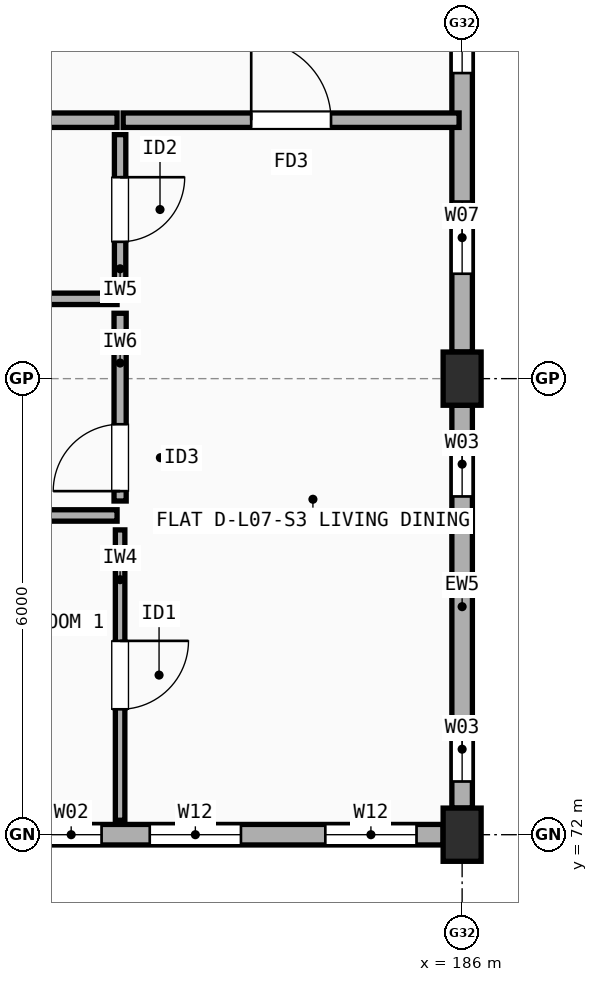
"""IFC4 building model, lengths in metres.
Left out: names, types, materials, properties, quantities, classifications, styles, units other than length and angle.
Written with IfcOpenShell. Run it as: python <this file> out.ifc"""

import sys

from ifc_helpers import new_model, si_unit, direction, frame, frame_2d, origin, origin_2d, place, context, subcontext, project, spatial, rectangle, extrude, element, fill, save


model = new_model("IFC4")
c1 = context("Model", 3, precision=1e-05, world=origin(), true_north=direction((0.0, 1.0)))
c2 = subcontext(c1, "Body", "Model", "MODEL_VIEW")
j1 = project(units=[si_unit("LENGTHUNIT", "METRE"), si_unit("PLANEANGLEUNIT", "RADIAN")], contexts=[c1])
p1 = place(None, origin())
s1 = spatial("IfcSite", under=j1, at=p1, CompositionType="ELEMENT")
p2 = place(p1, origin())
s2 = spatial("IfcBuilding", under=s1, at=p2, CompositionType="ELEMENT")
p3 = place(p2, frame((0.0, 0.0, 23.7)))
s3 = spatial("IfcBuildingStorey", under=s2, at=p3, CompositionType="ELEMENT", Elevation=23.7)
for number, where, z_axis, x_axis in (
    (1, (186.0, 72.0, 0.0), (0.0, 0.0, 1.0), (1.0, 0.0, 0.0)),
    (2, (186.0, 78.0, 0.0), (0.0, 0.0, 1.0), (1.0, 0.0, 0.0)),
):
    element("IfcColumn", number, at=place(p3, frame(where, z_axis=z_axis, x_axis=x_axis)), inside=s3, PredefinedType="COLUMN", context=c2, shape_type="SweptSolid", body=[
        extrude(rectangle(XDim=0.5, YDim=0.7, at=origin_2d()), origin(), (0.0, 0.0, 1.0), 2.975),
    ])
p4 = place(p3, frame((180.275, 72.0, 0.0), z_axis=(0.0, 0.0, 1.0), x_axis=(1.0, 0.0, 0.0)))
e3 = element("IfcWall", 3, at=p4, inside=s3, PredefinedType="STANDARD", context=c2, shape_type="SweptSolid", body=[
    extrude(rectangle(XDim=5.475, YDim=0.27, at=frame_2d((2.738, 0.0))), origin(), (0.0, 0.0, 1.0), 2.457),
])
p5 = place(p4, frame((1.615, 0.0, 0.9)))
e4 = element("IfcOpeningElement", 4, at=p5, cuts=e3, PredefinedType="OPENING", context=c2, shape_type="SweptSolid", body=[
    extrude(rectangle(XDim=1.2, YDim=1.35, at=frame_2d((0.6, 0.675))), frame((0.0, 0.145, 0.0), z_axis=(0.0, -1.0, 0.0), x_axis=(1.0, 0.0, 0.0)), (0.0, 0.0, 1.0), 0.29),
])
p6 = place(p4, frame((3.925, 0.0, 0.9)))
e5 = element("IfcOpeningElement", 5, at=p6, cuts=e3, PredefinedType="OPENING", context=c2, shape_type="SweptSolid", body=[
    extrude(rectangle(XDim=1.2, YDim=1.35, at=frame_2d((0.6, 0.675))), frame((0.0, 0.145, 0.0), z_axis=(0.0, -1.0, 0.0), x_axis=(1.0, 0.0, 0.0)), (0.0, 0.0, 1.0), 0.29),
])
p7 = place(p4, frame((0.181, 0.0, 0.9)))
e6 = element("IfcOpeningElement", 6, at=p7, cuts=e3, PredefinedType="OPENING", context=c2, shape_type="SweptSolid", body=[
    extrude(rectangle(XDim=0.8, YDim=1.2, at=frame_2d((0.4, 0.6))), frame((0.0, 0.145, 0.0), z_axis=(0.0, -1.0, 0.0), x_axis=(1.0, 0.0, 0.0)), (0.0, 0.0, 1.0), 0.29),
])
p8 = place(p3, frame((186.0, 72.35, 0.0), z_axis=(0.0, 0.0, 1.0), x_axis=(0.0, 1.0, 0.0)))
e7 = element("IfcWall", 7, at=p8, inside=s3, PredefinedType="STANDARD", context=c2, shape_type="SweptSolid", body=[
    extrude(rectangle(XDim=5.3, YDim=0.27, at=frame_2d((2.65, 0.0))), origin(), (0.0, 0.0, 1.0), 2.457),
])
p9 = place(p8, frame((0.35, 0.0, 0.9)))
e8 = element("IfcOpeningElement", 8, at=p9, cuts=e7, PredefinedType="OPENING", context=c2, shape_type="SweptSolid", body=[
    extrude(rectangle(XDim=0.85, YDim=1.25, at=frame_2d((0.425, 0.625))), frame((0.0, 0.145, 0.0), z_axis=(0.0, -1.0, 0.0), x_axis=(1.0, 0.0, 0.0)), (0.0, 0.0, 1.0), 0.29),
])
p10 = place(p8, frame((4.1, 0.0, 0.9)))
e9 = element("IfcOpeningElement", 9, at=p10, cuts=e7, PredefinedType="OPENING", context=c2, shape_type="SweptSolid", body=[
    extrude(rectangle(XDim=0.85, YDim=1.25, at=frame_2d((0.425, 0.625))), frame((0.0, 0.145, 0.0), z_axis=(0.0, -1.0, 0.0), x_axis=(1.0, 0.0, 0.0)), (0.0, 0.0, 1.0), 0.29),
])
p11 = place(p3, frame((186.0, 78.35, 0.0), z_axis=(0.0, 0.0, 1.0), x_axis=(0.0, 1.0, 0.0)))
e10 = element("IfcWall", 10, at=p11, inside=s3, PredefinedType="STANDARD", context=c2, shape_type="SweptSolid", body=[
    extrude(rectangle(XDim=5.3, YDim=0.27, at=frame_2d((2.65, 0.0))), origin(), (0.0, 0.0, 1.0), 2.457),
])
p12 = place(p11, frame((1.03, 0.0, 0.9)))
e11 = element("IfcOpeningElement", 11, at=p12, cuts=e10, PredefinedType="OPENING", context=c2, shape_type="SweptSolid", body=[
    extrude(rectangle(XDim=0.95, YDim=1.35, at=frame_2d((0.475, 0.675))), frame((0.0, 0.145, 0.0), z_axis=(0.0, -1.0, 0.0), x_axis=(1.0, 0.0, 0.0)), (0.0, 0.0, 1.0), 0.29),
])
p13 = place(p11, frame((3.67, 0.0, 0.9)))
e12 = element("IfcOpeningElement", 12, at=p13, cuts=e10, PredefinedType="OPENING", context=c2, shape_type="SweptSolid", body=[
    extrude(rectangle(XDim=1.05, YDim=1.35, at=frame_2d((0.525, 0.675))), frame((0.0, 0.145, 0.0), z_axis=(0.0, -1.0, 0.0), x_axis=(1.0, 0.0, 0.0)), (0.0, 0.0, 1.0), 0.29),
])
p14 = place(p3, frame((178.54, 81.4, 0.0), z_axis=(0.0, 0.0, 1.0), x_axis=(1.0, 0.0, 0.0)))
e13 = element("IfcWall", 13, at=p14, inside=s3, PredefinedType="SOLIDWALL", context=c2, shape_type="SweptSolid", body=[
    extrude(rectangle(XDim=2.92, YDim=0.19, at=frame_2d((1.46, 0.0))), origin(), (0.0, 0.0, 1.0), 2.458),
])
p15 = place(p3, frame((181.54, 81.4, 0.0), z_axis=(0.0, 0.0, 1.0), x_axis=(1.0, 0.0, 0.0)))
e14 = element("IfcWall", 14, at=p15, inside=s3, PredefinedType="SOLIDWALL", context=c2, shape_type="SweptSolid", body=[
    extrude(rectangle(XDim=4.42, YDim=0.19, at=frame_2d((2.21, 0.0))), origin(), (0.0, 0.0, 1.0), 2.457),
])
p16 = place(p15, frame((1.685, 0.0, 0.0)))
e15 = element("IfcOpeningElement", 15, at=p16, cuts=e14, PredefinedType="OPENING", context=c2, shape_type="SweptSolid", body=[
    extrude(rectangle(XDim=1.05, YDim=2.15, at=frame_2d((0.525, 1.075))), frame((0.0, 0.105, 0.0), z_axis=(0.0, -1.0, 0.0), x_axis=(1.0, 0.0, 0.0)), (0.0, 0.0, 1.0), 0.21),
])
p17 = place(p3, frame((181.5, 72.19, 0.0), z_axis=(0.0, 0.0, 1.0), x_axis=(0.0, 1.0, 0.0)))
e16 = element("IfcWall", 16, at=p17, inside=s3, PredefinedType="PARTITIONING", context=c2, shape_type="SweptSolid", body=[
    extrude(rectangle(XDim=3.82, YDim=0.125, at=frame_2d((1.91, 0.0))), origin(), (0.0, 0.0, 1.0), 2.975),
])
p18 = place(p17, frame((1.46, 0.0, 0.0)))
e17 = element("IfcOpeningElement", 17, at=p18, cuts=e16, PredefinedType="OPENING", context=c2, shape_type="SweptSolid", body=[
    extrude(rectangle(XDim=0.9, YDim=2.1, at=frame_2d((0.45, 1.05))), frame((0.0, 0.073, 0.0), z_axis=(0.0, -1.0, 0.0), x_axis=(1.0, 0.0, 0.0)), (0.0, 0.0, 1.0), 0.145),
])
p19 = place(p3, frame((181.5, 76.39, 0.0), z_axis=(0.0, 0.0, 1.0), x_axis=(0.0, 1.0, 0.0)))
e18 = element("IfcWall", 18, at=p19, inside=s3, PredefinedType="PLUMBINGWALL", context=c2, shape_type="SweptSolid", body=[
    extrude(rectangle(XDim=2.47, YDim=0.16, at=frame_2d((1.235, 0.0))), origin(), (0.0, 0.0, 1.0), 2.457),
])
p20 = place(p19, frame((0.13, 0.0, 0.0)))
e19 = element("IfcOpeningElement", 19, at=p20, cuts=e18, PredefinedType="OPENING", context=c2, shape_type="SweptSolid", body=[
    extrude(rectangle(XDim=0.88, YDim=2.1, at=frame_2d((0.44, 1.05))), frame((0.0, 0.09, 0.0), z_axis=(0.0, -1.0, 0.0), x_axis=(1.0, 0.0, 0.0)), (0.0, 0.0, 1.0), 0.18),
])
p21 = place(p3, frame((181.5, 79.24, 0.0), z_axis=(0.0, 0.0, 1.0), x_axis=(0.0, 1.0, 0.0)))
e20 = element("IfcWall", 20, at=p21, inside=s3, PredefinedType="PARTITIONING", context=c2, shape_type="SweptSolid", body=[
    extrude(rectangle(XDim=1.97, YDim=0.15, at=frame_2d((0.985, 0.0))), origin(), (0.0, 0.0, 1.0), 2.975),
])
p22 = place(p21, frame((0.56, 0.0, 0.0)))
e21 = element("IfcOpeningElement", 21, at=p22, cuts=e20, PredefinedType="OPENING", context=c2, shape_type="SweptSolid", body=[
    extrude(rectangle(XDim=0.85, YDim=2.1, at=frame_2d((0.425, 1.05))), frame((0.0, 0.085, 0.0), z_axis=(0.0, -1.0, 0.0), x_axis=(1.0, 0.0, 0.0)), (0.0, 0.0, 1.0), 0.17),
])
p23 = place(p3, frame((178.54, 76.2, 0.0), z_axis=(0.0, 0.0, 1.0), x_axis=(1.0, 0.0, 0.0)))
e22 = element("IfcWall", 22, at=p23, inside=s3, PredefinedType="PARTITIONING", context=c2, shape_type="SweptSolid", body=[
    extrude(rectangle(XDim=2.92, YDim=0.15, at=frame_2d((1.46, 0.0))), origin(), (0.0, 0.0, 1.0), 2.508),
])
p24 = place(p3, frame((178.54, 79.05, 0.0), z_axis=(0.0, 0.0, 1.0), x_axis=(1.0, 0.0, 0.0)))
e23 = element("IfcWall", 23, at=p24, inside=s3, PredefinedType="PARTITIONING", context=c2, shape_type="SweptSolid", body=[
    extrude(rectangle(XDim=2.92, YDim=0.15, at=frame_2d((1.46, 0.0))), origin(), (0.0, 0.0, 1.0), 2.458),
])
p25 = place(p5, origin())
e24 = element("IfcWindow", 24, at=p25, inside=s3, PartitioningType="SINGLE_PANEL", PredefinedType="WINDOW", context=c2, shape_type="SweptSolid", body=[
    extrude(rectangle(XDim=1.2, YDim=1.35, at=frame_2d((0.6, 0.675))), frame((0.0, 0.03, 0.0), z_axis=(0.0, -1.0, 0.0), x_axis=(1.0, 0.0, 0.0)), (0.0, 0.0, 1.0), 0.06),
])
fill(e4, e24)
p26 = place(p6, origin())
e25 = element("IfcWindow", 25, at=p26, inside=s3, PartitioningType="SINGLE_PANEL", PredefinedType="WINDOW", context=c2, shape_type="SweptSolid", body=[
    extrude(rectangle(XDim=1.2, YDim=1.35, at=frame_2d((0.6, 0.675))), frame((0.0, 0.03, 0.0), z_axis=(0.0, -1.0, 0.0), x_axis=(1.0, 0.0, 0.0)), (0.0, 0.0, 1.0), 0.06),
])
fill(e5, e25)
p27 = place(p9, origin())
e26 = element("IfcWindow", 26, at=p27, inside=s3, PartitioningType="SINGLE_PANEL", PredefinedType="WINDOW", context=c2, shape_type="SweptSolid", body=[
    extrude(rectangle(XDim=0.85, YDim=1.25, at=frame_2d((0.425, 0.625))), frame((0.0, 0.03, 0.0), z_axis=(0.0, -1.0, 0.0), x_axis=(1.0, 0.0, 0.0)), (0.0, 0.0, 1.0), 0.06),
])
fill(e8, e26)
p28 = place(p10, origin())
e27 = element("IfcWindow", 27, at=p28, inside=s3, PartitioningType="SINGLE_PANEL", PredefinedType="WINDOW", context=c2, shape_type="SweptSolid", body=[
    extrude(rectangle(XDim=0.85, YDim=1.25, at=frame_2d((0.425, 0.625))), frame((0.0, 0.03, 0.0), z_axis=(0.0, -1.0, 0.0), x_axis=(1.0, 0.0, 0.0)), (0.0, 0.0, 1.0), 0.06),
])
fill(e9, e27)
p29 = place(p12, origin())
e28 = element("IfcWindow", 28, at=p29, inside=s3, PartitioningType="SINGLE_PANEL", PredefinedType="WINDOW", context=c2, shape_type="SweptSolid", body=[
    extrude(rectangle(XDim=0.95, YDim=1.35, at=frame_2d((0.475, 0.675))), frame((0.0, 0.03, 0.0), z_axis=(0.0, -1.0, 0.0), x_axis=(1.0, 0.0, 0.0)), (0.0, 0.0, 1.0), 0.06),
])
fill(e11, e28)
p30 = place(p13, origin())
e29 = element("IfcWindow", 29, at=p30, inside=s3, PartitioningType="SINGLE_PANEL", PredefinedType="WINDOW", context=c2, shape_type="SweptSolid", body=[
    extrude(rectangle(XDim=1.05, YDim=1.35, at=frame_2d((0.525, 0.675))), frame((0.0, 0.03, 0.0), z_axis=(0.0, -1.0, 0.0), x_axis=(1.0, 0.0, 0.0)), (0.0, 0.0, 1.0), 0.06),
])
fill(e12, e29)
p31 = place(p7, origin())
e30 = element("IfcWindow", 30, at=p31, inside=s3, PartitioningType="SINGLE_PANEL", PredefinedType="WINDOW", context=c2, shape_type="SweptSolid", body=[
    extrude(rectangle(XDim=0.8, YDim=1.2, at=frame_2d((0.4, 0.6))), frame((0.0, 0.03, 0.0), z_axis=(0.0, -1.0, 0.0), x_axis=(1.0, 0.0, 0.0)), (0.0, 0.0, 1.0), 0.06),
])
fill(e6, e30)
p32 = place(p16, origin())
e31 = element("IfcDoor", 31, at=p32, inside=s3, OperationType="SINGLE_SWING_LEFT", PredefinedType="DOOR", context=c2, shape_type="SweptSolid", body=[
    extrude(rectangle(XDim=1.05, YDim=2.15, at=frame_2d((0.525, 1.075))), frame((0.0, 0.025, 0.0), z_axis=(0.0, -1.0, 0.0), x_axis=(1.0, 0.0, 0.0)), (0.0, 0.0, 1.0), 0.05),
])
fill(e15, e31)
p33 = place(p18, origin())
e32 = element("IfcDoor", 32, at=p33, inside=s3, OperationType="SINGLE_SWING_RIGHT", PredefinedType="DOOR", context=c2, shape_type="SweptSolid", body=[
    extrude(rectangle(XDim=0.9, YDim=2.1, at=frame_2d((0.45, 1.05))), frame((0.0, 0.025, 0.0), z_axis=(0.0, -1.0, 0.0), x_axis=(1.0, 0.0, 0.0)), (0.0, 0.0, 1.0), 0.05),
])
fill(e17, e32)
p34 = place(p20, origin())
e33 = element("IfcDoor", 33, at=p34, inside=s3, OperationType="SINGLE_SWING_LEFT", PredefinedType="DOOR", context=c2, shape_type="SweptSolid", body=[
    extrude(rectangle(XDim=0.88, YDim=2.1, at=frame_2d((0.44, 1.05))), frame((0.0, 0.025, 0.0), z_axis=(0.0, -1.0, 0.0), x_axis=(1.0, 0.0, 0.0)), (0.0, 0.0, 1.0), 0.05),
])
fill(e19, e33)
p35 = place(p22, origin())
e34 = element("IfcDoor", 34, at=p35, inside=s3, OperationType="SINGLE_SWING_RIGHT", PredefinedType="DOOR", context=c2, shape_type="SweptSolid", body=[
    extrude(rectangle(XDim=0.85, YDim=2.1, at=frame_2d((0.425, 1.05))), frame((0.0, 0.025, 0.0), z_axis=(0.0, -1.0, 0.0), x_axis=(1.0, 0.0, 0.0)), (0.0, 0.0, 1.0), 0.05),
])
fill(e21, e34)
save(model, sys.argv[1])
